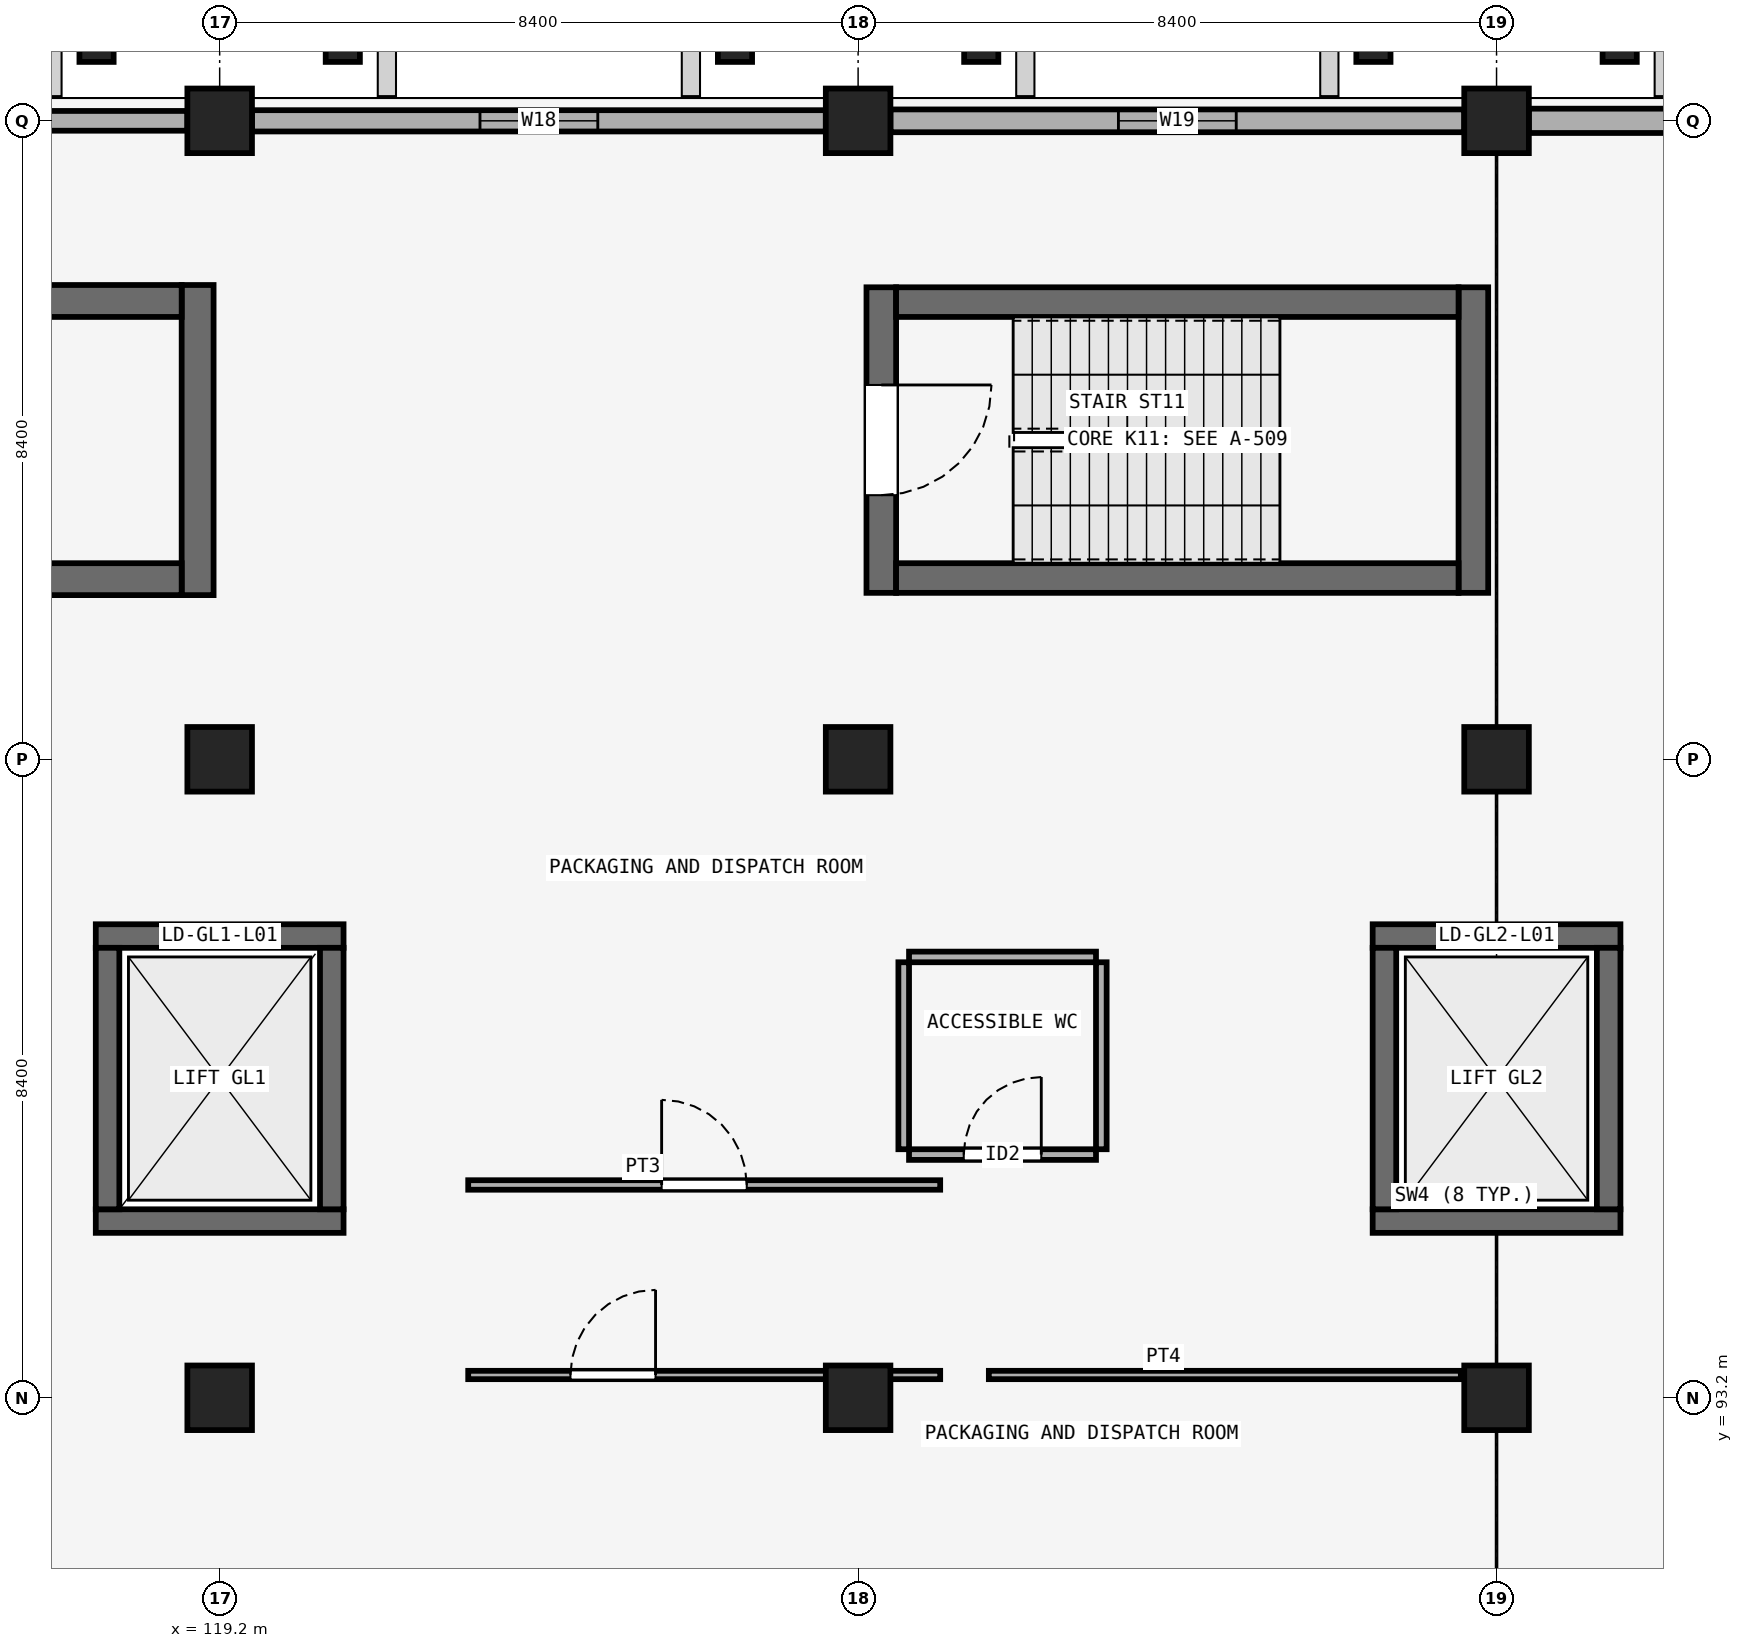
"""IFC4 building model, lengths in metres.
Left out: names, types, materials, properties, quantities, classifications, styles, units other than length and angle.
Written with IfcOpenShell. Run it as: python <this file> out.ifc"""

import sys

from ifc_helpers import new_model, si_unit, direction, frame, frame_2d, origin, origin_2d, place, context, subcontext, project, spatial, rectangle, extrude, element, fill, save


model = new_model("IFC4")
c1 = context("Model", 3, precision=1e-05, world=origin(), true_north=direction((0.0, 1.0)))
c2 = subcontext(c1, "Body", "Model", "MODEL_VIEW")
j1 = project(units=[si_unit("LENGTHUNIT", "METRE"), si_unit("PLANEANGLEUNIT", "RADIAN")], contexts=[c1])
p1 = place(None, origin())
s1 = spatial("IfcSite", under=j1, at=p1, CompositionType="ELEMENT")
p2 = place(p1, origin())
s2 = spatial("IfcBuilding", under=s1, at=p2, CompositionType="ELEMENT")
p3 = place(p2, frame((0.0, 0.0, 5.4)))
s3 = spatial("IfcBuildingStorey", under=s2, at=p3, CompositionType="ELEMENT", Elevation=5.4)
for number, where, z_axis, x_axis in (
    (1, (119.2, 93.2, 0.0), (0.0, 0.0, 1.0), (1.0, 0.0, 0.0)),
    (2, (127.6, 93.2, 0.0), (0.0, 0.0, 1.0), (1.0, 0.0, 0.0)),
    (3, (136.0, 93.2, 0.0), (0.0, 0.0, 1.0), (1.0, 0.0, 0.0)),
    (4, (119.2, 101.6, 0.0), (0.0, 0.0, 1.0), (1.0, 0.0, 0.0)),
    (5, (127.6, 101.6, 0.0), (0.0, 0.0, 1.0), (1.0, 0.0, 0.0)),
    (6, (136.0, 101.6, 0.0), (0.0, 0.0, 1.0), (1.0, 0.0, 0.0)),
    (7, (119.2, 110.0, 0.0), (0.0, 0.0, 1.0), (1.0, 0.0, 0.0)),
    (8, (127.6, 110.0, 0.0), (0.0, 0.0, 1.0), (1.0, 0.0, 0.0)),
    (9, (136.0, 110.0, 0.0), (0.0, 0.0, 1.0), (1.0, 0.0, 0.0)),
):
    element("IfcColumn", number, at=place(p3, frame(where, z_axis=z_axis, x_axis=x_axis)), inside=s3, PredefinedType="COLUMN", context=c2, shape_type="SweptSolid", body=[
        extrude(rectangle(XDim=0.85, YDim=0.85, at=origin_2d()), origin(), (0.0, 0.0, 1.0), 4.5),
    ])
for number, where, z_axis, x_axis in (
    (10, (117.58, 111.05, 0.0), (0.0, 0.0, 1.0), (1.0, 0.0, 0.0)),
    (11, (120.82, 111.05, 0.0), (0.0, 0.0, 1.0), (1.0, 0.0, 0.0)),
    (12, (125.98, 111.05, 0.0), (0.0, 0.0, 1.0), (1.0, 0.0, 0.0)),
    (13, (129.22, 111.05, 0.0), (0.0, 0.0, 1.0), (1.0, 0.0, 0.0)),
    (14, (134.38, 111.05, 0.0), (0.0, 0.0, 1.0), (1.0, 0.0, 0.0)),
    (15, (137.62, 111.05, 0.0), (0.0, 0.0, 1.0), (1.0, 0.0, 0.0)),
):
    element("IfcColumn", number, at=place(p3, frame(where, z_axis=z_axis, x_axis=x_axis)), inside=s3, PredefinedType="PILASTER", context=c2, shape_type="SweptSolid", body=[
        extrude(rectangle(XDim=0.45, YDim=0.55, at=origin_2d()), origin(), (0.0, 0.0, 1.0), 4.5),
    ])
p4 = place(p3, frame((111.225, 110.0, 0.0), z_axis=(0.0, 0.0, 1.0), x_axis=(1.0, 0.0, 0.0)))
e16 = element("IfcWall", 16, at=p4, inside=s3, PredefinedType="SOLIDWALL", context=c2, shape_type="SweptSolid", body=[
    extrude(rectangle(XDim=7.55, YDim=0.26, at=frame_2d((3.775, 0.0))), origin(), (0.0, 0.0, 1.0), 3.45),
])
p5 = place(p4, frame((3.0, 0.0, 0.95)))
e17 = element("IfcOpeningElement", 17, at=p5, cuts=e16, PredefinedType="OPENING", context=c2, shape_type="SweptSolid", body=[
    extrude(rectangle(XDim=1.55, YDim=1.35, at=frame_2d((0.775, 0.675))), frame((0.0, 0.14, 0.0), z_axis=(0.0, -1.0, 0.0), x_axis=(1.0, 0.0, 0.0)), (0.0, 0.0, 1.0), 0.28),
])
p6 = place(p3, frame((119.625, 110.0, 0.0), z_axis=(0.0, 0.0, 1.0), x_axis=(1.0, 0.0, 0.0)))
e18 = element("IfcWall", 18, at=p6, inside=s3, PredefinedType="SOLIDWALL", context=c2, shape_type="SweptSolid", body=[
    extrude(rectangle(XDim=7.55, YDim=0.28, at=frame_2d((3.775, 0.0))), origin(), (0.0, 0.0, 1.0), 3.45),
])
p7 = place(p6, frame((3.0, 0.0, 0.95)))
e19 = element("IfcOpeningElement", 19, at=p7, cuts=e18, PredefinedType="OPENING", context=c2, shape_type="SweptSolid", body=[
    extrude(rectangle(XDim=1.55, YDim=1.6, at=frame_2d((0.775, 0.8))), frame((0.0, 0.15, 0.0), z_axis=(0.0, -1.0, 0.0), x_axis=(1.0, 0.0, 0.0)), (0.0, 0.0, 1.0), 0.3),
])
p8 = place(p3, frame((128.025, 110.0, 0.0), z_axis=(0.0, 0.0, 1.0), x_axis=(1.0, 0.0, 0.0)))
e20 = element("IfcWall", 20, at=p8, inside=s3, PredefinedType="SOLIDWALL", context=c2, shape_type="SweptSolid", body=[
    extrude(rectangle(XDim=7.55, YDim=0.3, at=frame_2d((3.775, 0.0))), origin(), (0.0, 0.0, 1.0), 3.45),
])
p9 = place(p8, frame((3.0, 0.0, 0.95)))
e21 = element("IfcOpeningElement", 21, at=p9, cuts=e20, PredefinedType="OPENING", context=c2, shape_type="SweptSolid", body=[
    extrude(rectangle(XDim=1.55, YDim=1.85, at=frame_2d((0.775, 0.925))), frame((0.0, 0.16, 0.0), z_axis=(0.0, -1.0, 0.0), x_axis=(1.0, 0.0, 0.0)), (0.0, 0.0, 1.0), 0.32),
])
p10 = place(p3, frame((136.425, 110.0, 0.0), z_axis=(0.0, 0.0, 1.0), x_axis=(1.0, 0.0, 0.0)))
e22 = element("IfcWall", 22, at=p10, inside=s3, PredefinedType="SOLIDWALL", context=c2, shape_type="SweptSolid", body=[
    extrude(rectangle(XDim=7.55, YDim=0.32, at=frame_2d((3.775, 0.0))), origin(), (0.0, 0.0, 1.0), 3.45),
])
p11 = place(p10, frame((3.0, 0.0, 0.95)))
e23 = element("IfcOpeningElement", 23, at=p11, cuts=e22, PredefinedType="OPENING", context=c2, shape_type="SweptSolid", body=[
    extrude(rectangle(XDim=1.55, YDim=2.1, at=frame_2d((0.775, 1.05))), frame((0.0, 0.17, 0.0), z_axis=(0.0, -1.0, 0.0), x_axis=(1.0, 0.0, 0.0)), (0.0, 0.0, 1.0), 0.34),
])
p12 = place(p3, frame((118.91, 103.76, 0.0), z_axis=(0.0, 0.0, 1.0), x_axis=(0.0, 1.0, 0.0)))
e24 = element("IfcWall", 24, at=p12, inside=s3, PredefinedType="SHEAR", context=c2, shape_type="SweptSolid", body=[
    extrude(rectangle(XDim=4.08, YDim=0.42, at=frame_2d((2.04, 0.0))), origin(), (0.0, 0.0, 1.0), 4.2),
])
for number, where, z_axis, x_axis in (
    (25, (111.3, 103.97, 0.0), (0.0, 0.0, 1.0), (1.0, 0.0, 0.0)),
    (26, (111.3, 107.63, 0.0), (0.0, 0.0, 1.0), (1.0, 0.0, 0.0)),
):
    element("IfcWall", number, at=place(p3, frame(where, z_axis=z_axis, x_axis=x_axis)), inside=s3, PredefinedType="SHEAR", context=c2, shape_type="SweptSolid", body=[
        extrude(rectangle(XDim=7.4, YDim=0.42, at=frame_2d((3.7, 0.0))), origin(), (0.0, 0.0, 1.0), 4.2),
    ])
p13 = place(p3, frame((127.905, 107.81, 0.0), z_axis=(0.0, 0.0, 1.0), x_axis=(0.0, -1.0, 0.0)))
e27 = element("IfcWall", 27, at=p13, inside=s3, PredefinedType="SHEAR", context=c2, shape_type="SweptSolid", body=[
    extrude(rectangle(XDim=4.02, YDim=0.39, at=frame_2d((2.01, 0.0))), origin(), (0.0, 0.0, 1.0), 4.2),
])
p14 = place(p13, frame((1.285, 0.0, 0.0)))
e28 = element("IfcOpeningElement", 28, at=p14, cuts=e27, PredefinedType="OPENING", context=c2, shape_type="SweptSolid", body=[
    extrude(rectangle(XDim=1.45, YDim=2.2, at=frame_2d((0.725, 1.1))), frame((0.0, 0.205, 0.0), z_axis=(0.0, -1.0, 0.0), x_axis=(1.0, 0.0, 0.0)), (0.0, 0.0, 1.0), 0.41),
])
p15 = place(p3, frame((135.695, 103.79, 0.0), z_axis=(0.0, 0.0, 1.0), x_axis=(0.0, 1.0, 0.0)))
e29 = element("IfcWall", 29, at=p15, inside=s3, PredefinedType="SHEAR", context=c2, shape_type="SweptSolid", body=[
    extrude(rectangle(XDim=4.02, YDim=0.39, at=frame_2d((2.01, 0.0))), origin(), (0.0, 0.0, 1.0), 4.2),
])
for number, where, z_axis, x_axis in (
    (30, (128.1, 103.985, 0.0), (0.0, 0.0, 1.0), (1.0, 0.0, 0.0)),
    (31, (128.1, 107.615, 0.0), (0.0, 0.0, 1.0), (1.0, 0.0, 0.0)),
):
    element("IfcWall", number, at=place(p3, frame(where, z_axis=z_axis, x_axis=x_axis)), inside=s3, PredefinedType="SHEAR", context=c2, shape_type="SweptSolid", body=[
        extrude(rectangle(XDim=7.4, YDim=0.39, at=frame_2d((3.7, 0.0))), origin(), (0.0, 0.0, 1.0), 4.2),
    ])
p16 = place(p3, frame((117.57, 95.525, 0.0), z_axis=(0.0, 0.0, 1.0), x_axis=(1.0, 0.0, 0.0)))
e32 = element("IfcWall", 32, at=p16, inside=s3, PredefinedType="SHEAR", context=c2, shape_type="SweptSolid", body=[
    extrude(rectangle(XDim=3.26, YDim=0.31, at=frame_2d((1.63, 0.0))), origin(), (0.0, 0.0, 1.0), 4.2),
])
p17 = place(p3, frame((117.57, 99.275, 0.0), z_axis=(0.0, 0.0, 1.0), x_axis=(1.0, 0.0, 0.0)))
e33 = element("IfcWall", 33, at=p17, inside=s3, PredefinedType="SHEAR", context=c2, shape_type="SweptSolid", body=[
    extrude(rectangle(XDim=3.26, YDim=0.31, at=frame_2d((1.63, 0.0))), origin(), (0.0, 0.0, 1.0), 4.2),
])
p18 = place(p17, frame((0.88, 0.0, 0.0)))
e34 = element("IfcOpeningElement", 34, at=p18, cuts=e33, PredefinedType="OPENING", context=c2, shape_type="SweptSolid", body=[
    extrude(rectangle(XDim=1.5, YDim=2.35, at=frame_2d((0.75, 1.175))), frame((0.0, 0.165, 0.0), z_axis=(0.0, -1.0, 0.0), x_axis=(1.0, 0.0, 0.0)), (0.0, 0.0, 1.0), 0.33),
])
for number, where, z_axis, x_axis in (
    (35, (117.725, 95.68, 0.0), (0.0, 0.0, 1.0), (0.0, 1.0, 0.0)),
    (36, (120.675, 95.68, 0.0), (0.0, 0.0, 1.0), (0.0, 1.0, 0.0)),
):
    element("IfcWall", number, at=place(p3, frame(where, z_axis=z_axis, x_axis=x_axis)), inside=s3, PredefinedType="SHEAR", context=c2, shape_type="SweptSolid", body=[
        extrude(rectangle(XDim=3.44, YDim=0.31, at=frame_2d((1.72, 0.0))), origin(), (0.0, 0.0, 1.0), 4.2),
    ])
p19 = place(p3, frame((134.37, 95.525, 0.0), z_axis=(0.0, 0.0, 1.0), x_axis=(1.0, 0.0, 0.0)))
e37 = element("IfcWall", 37, at=p19, inside=s3, PredefinedType="SHEAR", context=c2, shape_type="SweptSolid", body=[
    extrude(rectangle(XDim=3.26, YDim=0.31, at=frame_2d((1.63, 0.0))), origin(), (0.0, 0.0, 1.0), 4.2),
])
p20 = place(p3, frame((134.37, 99.275, 0.0), z_axis=(0.0, 0.0, 1.0), x_axis=(1.0, 0.0, 0.0)))
e38 = element("IfcWall", 38, at=p20, inside=s3, PredefinedType="SHEAR", context=c2, shape_type="SweptSolid", body=[
    extrude(rectangle(XDim=3.26, YDim=0.31, at=frame_2d((1.63, 0.0))), origin(), (0.0, 0.0, 1.0), 4.2),
])
p21 = place(p20, frame((0.88, 0.0, 0.0)))
e39 = element("IfcOpeningElement", 39, at=p21, cuts=e38, PredefinedType="OPENING", context=c2, shape_type="SweptSolid", body=[
    extrude(rectangle(XDim=1.5, YDim=2.35, at=frame_2d((0.75, 1.175))), frame((0.0, 0.165, 0.0), z_axis=(0.0, -1.0, 0.0), x_axis=(1.0, 0.0, 0.0)), (0.0, 0.0, 1.0), 0.33),
])
for number, where, z_axis, x_axis in (
    (40, (134.525, 95.68, 0.0), (0.0, 0.0, 1.0), (0.0, 1.0, 0.0)),
    (41, (137.475, 95.68, 0.0), (0.0, 0.0, 1.0), (0.0, 1.0, 0.0)),
):
    element("IfcWall", number, at=place(p3, frame(where, z_axis=z_axis, x_axis=x_axis)), inside=s3, PredefinedType="SHEAR", context=c2, shape_type="SweptSolid", body=[
        extrude(rectangle(XDim=3.44, YDim=0.31, at=frame_2d((1.72, 0.0))), origin(), (0.0, 0.0, 1.0), 4.2),
    ])
p22 = place(p3, frame((128.27, 96.4, 0.0), z_axis=(0.0, 0.0, 1.0), x_axis=(1.0, 0.0, 0.0)))
e42 = element("IfcWall", 42, at=p22, inside=s3, PredefinedType="PARTITIONING", context=c2, shape_type="SweptSolid", body=[
    extrude(rectangle(XDim=2.46, YDim=0.14, at=frame_2d((1.23, 0.0))), origin(), (0.0, 0.0, 1.0), 4.2),
])
p23 = place(p22, frame((0.72, 0.0, 0.0)))
e43 = element("IfcOpeningElement", 43, at=p23, cuts=e42, PredefinedType="OPENING", context=c2, shape_type="SweptSolid", body=[
    extrude(rectangle(XDim=1.02, YDim=2.15, at=frame_2d((0.51, 1.075))), frame((0.0, 0.08, 0.0), z_axis=(0.0, -1.0, 0.0), x_axis=(1.0, 0.0, 0.0)), (0.0, 0.0, 1.0), 0.16),
])
for number, where, z_axis, x_axis in (
    (44, (128.27, 99.0, 0.0), (0.0, 0.0, 1.0), (1.0, 0.0, 0.0)),
    (45, (128.2, 96.47, 0.0), (0.0, 0.0, 1.0), (0.0, 1.0, 0.0)),
    (46, (130.8, 96.47, 0.0), (0.0, 0.0, 1.0), (0.0, 1.0, 0.0)),
):
    element("IfcWall", number, at=place(p3, frame(where, z_axis=z_axis, x_axis=x_axis)), inside=s3, PredefinedType="PARTITIONING", context=c2, shape_type="SweptSolid", body=[
        extrude(rectangle(XDim=2.46, YDim=0.14, at=frame_2d((1.23, 0.0))), origin(), (0.0, 0.0, 1.0), 4.2),
    ])
p24 = place(p3, frame((122.47, 96.0, 0.0), z_axis=(0.0, 0.0, 1.0), x_axis=(1.0, 0.0, 0.0)))
e47 = element("IfcWall", 47, at=p24, inside=s3, PredefinedType="PARTITIONING", context=c2, shape_type="SweptSolid", body=[
    extrude(rectangle(XDim=6.21, YDim=0.125, at=frame_2d((3.105, 0.0))), origin(), (0.0, 0.0, 1.0), 3.5),
])
p25 = place(p24, frame((2.545, 0.0, 0.0)))
e48 = element("IfcOpeningElement", 48, at=p25, cuts=e47, PredefinedType="OPENING", context=c2, shape_type="SweptSolid", body=[
    extrude(rectangle(XDim=1.12, YDim=2.22, at=frame_2d((0.56, 1.11))), frame((0.0, 0.073, 0.0), z_axis=(0.0, -1.0, 0.0), x_axis=(1.0, 0.0, 0.0)), (0.0, 0.0, 1.0), 0.145),
])
p26 = place(p3, frame((122.47, 93.5, 0.0), z_axis=(0.0, 0.0, 1.0), x_axis=(1.0, 0.0, 0.0)))
e49 = element("IfcWall", 49, at=p26, inside=s3, PredefinedType="PARTITIONING", context=c2, shape_type="SweptSolid", body=[
    extrude(rectangle(XDim=6.21, YDim=0.11, at=frame_2d((3.105, 0.0))), origin(), (0.0, 0.0, 1.0), 3.5),
])
p27 = place(p26, frame((1.345, 0.0, 0.0)))
e50 = element("IfcOpeningElement", 50, at=p27, cuts=e49, PredefinedType="OPENING", context=c2, shape_type="SweptSolid", body=[
    extrude(rectangle(XDim=1.12, YDim=2.34, at=frame_2d((0.56, 1.17))), frame((0.0, 0.065, 0.0), z_axis=(0.0, -1.0, 0.0), x_axis=(1.0, 0.0, 0.0)), (0.0, 0.0, 1.0), 0.13),
])
p28 = place(p3, frame((129.32, 93.5, 0.0), z_axis=(0.0, 0.0, 1.0), x_axis=(1.0, 0.0, 0.0)))
e51 = element("IfcWall", 51, at=p28, inside=s3, PredefinedType="PARTITIONING", context=c2, shape_type="SweptSolid", body=[
    extrude(rectangle(XDim=6.21, YDim=0.11, at=frame_2d((3.105, 0.0))), origin(), (0.0, 0.0, 1.0), 4.2),
])
p29 = place(p7, origin())
e52 = element("IfcWindow", 52, at=p29, inside=s3, PartitioningType="SINGLE_PANEL", PredefinedType="WINDOW", context=c2, shape_type="SweptSolid", body=[
    extrude(rectangle(XDim=1.55, YDim=1.6, at=frame_2d((0.775, 0.8))), frame((0.0, 0.03, 0.0), z_axis=(0.0, -1.0, 0.0), x_axis=(1.0, 0.0, 0.0)), (0.0, 0.0, 1.0), 0.06),
])
fill(e19, e52)
p30 = place(p9, origin())
e53 = element("IfcWindow", 53, at=p30, inside=s3, PartitioningType="SINGLE_PANEL", PredefinedType="WINDOW", context=c2, shape_type="SweptSolid", body=[
    extrude(rectangle(XDim=1.55, YDim=1.85, at=frame_2d((0.775, 0.925))), frame((0.0, 0.03, 0.0), z_axis=(0.0, -1.0, 0.0), x_axis=(1.0, 0.0, 0.0)), (0.0, 0.0, 1.0), 0.06),
])
fill(e21, e53)
p31 = place(p14, origin())
e54 = element("IfcDoor", 54, at=p31, inside=s3, OperationType="SINGLE_SWING_LEFT", PredefinedType="DOOR", context=c2, shape_type="SweptSolid", body=[
    extrude(rectangle(XDim=1.45, YDim=2.2, at=frame_2d((0.725, 1.1))), frame((0.0, 0.025, 0.0), z_axis=(0.0, -1.0, 0.0), x_axis=(1.0, 0.0, 0.0)), (0.0, 0.0, 1.0), 0.05),
])
fill(e28, e54)
p32 = place(p18, origin())
e55 = element("IfcDoor", 55, at=p32, inside=s3, OperationType="SLIDING_TO_LEFT", PredefinedType="DOOR", context=c2, shape_type="SweptSolid", body=[
    extrude(rectangle(XDim=1.5, YDim=2.35, at=frame_2d((0.75, 1.175))), frame((0.0, 0.025, 0.0), z_axis=(0.0, -1.0, 0.0), x_axis=(1.0, 0.0, 0.0)), (0.0, 0.0, 1.0), 0.05),
])
fill(e34, e55)
p33 = place(p21, origin())
e56 = element("IfcDoor", 56, at=p33, inside=s3, OperationType="SLIDING_TO_LEFT", PredefinedType="DOOR", context=c2, shape_type="SweptSolid", body=[
    extrude(rectangle(XDim=1.5, YDim=2.35, at=frame_2d((0.75, 1.175))), frame((0.0, 0.025, 0.0), z_axis=(0.0, -1.0, 0.0), x_axis=(1.0, 0.0, 0.0)), (0.0, 0.0, 1.0), 0.05),
])
fill(e39, e56)
p34 = place(p23, origin())
e57 = element("IfcDoor", 57, at=p34, inside=s3, OperationType="SINGLE_SWING_RIGHT", PredefinedType="DOOR", context=c2, shape_type="SweptSolid", body=[
    extrude(rectangle(XDim=1.02, YDim=2.15, at=frame_2d((0.51, 1.075))), frame((0.0, 0.025, 0.0), z_axis=(0.0, -1.0, 0.0), x_axis=(1.0, 0.0, 0.0)), (0.0, 0.0, 1.0), 0.05),
])
fill(e43, e57)
p35 = place(p25, origin())
e58 = element("IfcDoor", 58, at=p35, inside=s3, OperationType="SINGLE_SWING_LEFT", PredefinedType="DOOR", context=c2, shape_type="SweptSolid", body=[
    extrude(rectangle(XDim=1.12, YDim=2.22, at=frame_2d((0.56, 1.11))), frame((0.0, 0.025, 0.0), z_axis=(0.0, -1.0, 0.0), x_axis=(1.0, 0.0, 0.0)), (0.0, 0.0, 1.0), 0.05),
])
fill(e48, e58)
p36 = place(p27, origin())
e59 = element("IfcDoor", 59, at=p36, inside=s3, OperationType="SINGLE_SWING_RIGHT", PredefinedType="DOOR", context=c2, shape_type="SweptSolid", body=[
    extrude(rectangle(XDim=1.12, YDim=2.34, at=frame_2d((0.56, 1.17))), frame((0.0, 0.025, 0.0), z_axis=(0.0, -1.0, 0.0), x_axis=(1.0, 0.0, 0.0)), (0.0, 0.0, 1.0), 0.05),
])
fill(e50, e59)
save(model, sys.argv[1])
